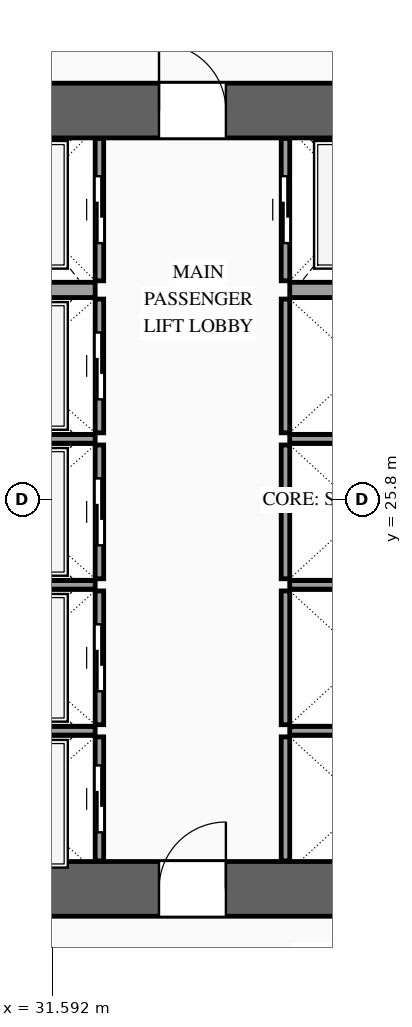
"""IFC4 building model, lengths in metres.
Left out: names, types, materials, properties, quantities, classifications, styles, units other than length and angle.
Written with IfcOpenShell. Run it as: python <this file> out.ifc"""

import sys

from ifc_helpers import new_model, si_unit, direction, frame, frame_2d, origin, place, context, subcontext, project, spatial, rectangle, extrude, source, transform, mapped, element, fill, save


model = new_model("IFC4")
c1 = context("Model", 3, precision=1e-05, world=origin(), true_north=direction((0.0, 1.0)))
c2 = subcontext(c1, "Body", "Model", "MODEL_VIEW")
j1 = project(units=[si_unit("LENGTHUNIT", "METRE"), si_unit("PLANEANGLEUNIT", "RADIAN")], contexts=[c1])
p1 = place(None, origin())
s1 = spatial("IfcSite", under=j1, at=p1, CompositionType="ELEMENT")
p2 = place(p1, origin())
s2 = spatial("IfcBuilding", under=s1, at=p2, CompositionType="ELEMENT")
p3 = place(p2, frame((0.0, 0.0, 78.4)))
s3 = spatial("IfcBuildingStorey", under=s2, at=p3, CompositionType="ELEMENT", Elevation=78.4)
p4 = place(p3, frame((23.35, 19.4, 0.0), z_axis=(0.0, 0.0, 1.0), x_axis=(1.0, 0.0, 0.0)))
e1 = element("IfcWall", 1, at=p4, inside=s3, PredefinedType="SHEAR", context=c2, shape_type="SweptSolid", body=[
    extrude(rectangle(XDim=27.3, YDim=0.9, at=frame_2d((13.65, 0.0))), origin(), (0.0, 0.0, 1.0), 3.6),
])
p5 = place(p4, frame((2.1, 0.0, 0.0)))
e2 = element("IfcOpeningElement", 2, at=p5, cuts=e1, PredefinedType="OPENING", context=c2, shape_type="SweptSolid", body=[
    extrude(rectangle(XDim=1.1, YDim=2.2, at=frame_2d((0.55, 1.1))), frame((0.0, 0.465, 0.0), z_axis=(0.0, -1.0, 0.0), x_axis=(1.0, 0.0, 0.0)), (0.0, 0.0, 1.0), 0.93),
])
p6 = place(p4, frame((10.0, 0.0, 0.0)))
e3 = element("IfcOpeningElement", 3, at=p6, cuts=e1, PredefinedType="OPENING", context=c2, shape_type="SweptSolid", body=[
    extrude(rectangle(XDim=1.1, YDim=2.2, at=frame_2d((0.55, 1.1))), frame((0.0, 0.465, 0.0), z_axis=(0.0, -1.0, 0.0), x_axis=(1.0, 0.0, 0.0)), (0.0, 0.0, 1.0), 0.93),
])
p7 = place(p4, frame((23.2, 0.0, 0.0)))
e4 = element("IfcOpeningElement", 4, at=p7, cuts=e1, PredefinedType="OPENING", context=c2, shape_type="SweptSolid", body=[
    extrude(rectangle(XDim=1.1, YDim=2.2, at=frame_2d((0.55, 1.1))), frame((0.0, 0.465, 0.0), z_axis=(0.0, -1.0, 0.0), x_axis=(1.0, 0.0, 0.0)), (0.0, 0.0, 1.0), 0.93),
])
p8 = place(p4, frame((19.82, 0.0, 0.0)))
e5 = element("IfcOpeningElement", 5, at=p8, cuts=e1, PredefinedType="OPENING", context=c2, shape_type="SweptSolid", body=[
    extrude(rectangle(XDim=0.9, YDim=2.15, at=frame_2d((0.45, 1.075))), frame((0.0, 0.465, 0.0), z_axis=(0.0, -1.0, 0.0), x_axis=(1.0, 0.0, 0.0)), (0.0, 0.0, 1.0), 0.93),
])
p9 = place(p4, frame((18.38, 0.0, 0.0)))
e6 = element("IfcOpeningElement", 6, at=p9, cuts=e1, PredefinedType="OPENING", context=c2, shape_type="SweptSolid", body=[
    extrude(rectangle(XDim=0.9, YDim=2.15, at=frame_2d((0.45, 1.075))), frame((0.0, 0.465, 0.0), z_axis=(0.0, -1.0, 0.0), x_axis=(1.0, 0.0, 0.0)), (0.0, 0.0, 1.0), 0.93),
])
p10 = place(p3, frame((23.35, 32.2, 0.0), z_axis=(0.0, 0.0, 1.0), x_axis=(1.0, 0.0, 0.0)))
e7 = element("IfcWall", 7, at=p10, inside=s3, PredefinedType="SHEAR", context=c2, shape_type="SweptSolid", body=[
    extrude(rectangle(XDim=27.3, YDim=0.9, at=frame_2d((13.65, 0.0))), origin(), (0.0, 0.0, 1.0), 3.6),
])
p11 = place(p10, frame((4.72, 0.0, 0.0)))
e8 = element("IfcOpeningElement", 8, at=p11, cuts=e7, PredefinedType="OPENING", context=c2, shape_type="SweptSolid", body=[
    extrude(rectangle(XDim=0.9, YDim=2.15, at=frame_2d((0.45, 1.075))), frame((0.0, 0.465, 0.0), z_axis=(0.0, -1.0, 0.0), x_axis=(1.0, 0.0, 0.0)), (0.0, 0.0, 1.0), 0.93),
])
p12 = place(p10, frame((10.0, 0.0, 0.0)))
e9 = element("IfcOpeningElement", 9, at=p12, cuts=e7, PredefinedType="OPENING", context=c2, shape_type="SweptSolid", body=[
    extrude(rectangle(XDim=1.1, YDim=2.2, at=frame_2d((0.55, 1.1))), frame((0.0, 0.465, 0.0), z_axis=(0.0, -1.0, 0.0), x_axis=(1.0, 0.0, 0.0)), (0.0, 0.0, 1.0), 0.93),
])
p13 = place(p10, frame((15.85, 0.0, 0.0)))
e10 = element("IfcOpeningElement", 10, at=p13, cuts=e7, PredefinedType="OPENING", context=c2, shape_type="SweptSolid", body=[
    extrude(rectangle(XDim=1.1, YDim=2.2, at=frame_2d((0.55, 1.1))), frame((0.0, 0.465, 0.0), z_axis=(0.0, -1.0, 0.0), x_axis=(1.0, 0.0, 0.0)), (0.0, 0.0, 1.0), 0.93),
])
p14 = place(p3, frame((32.37, 19.86, 0.0), z_axis=(0.0, 0.0, 1.0), x_axis=(0.0, 1.0, 0.0)))
e11 = element("IfcWall", 11, at=p14, inside=s3, PredefinedType="SOLIDWALL", context=c2, shape_type="SweptSolid", body=[
    extrude(rectangle(XDim=2.04, YDim=0.14, at=frame_2d((1.02, 0.0))), origin(), (0.0, 0.0, 1.0), 3.38),
])
p15 = place(p14, frame((0.47, 0.0, 0.0)))
e12 = element("IfcOpeningElement", 12, at=p15, cuts=e11, PredefinedType="OPENING", context=c2, shape_type="SweptSolid", body=[
    extrude(rectangle(XDim=1.1, YDim=2.2, at=frame_2d((0.55, 1.1))), frame((0.0, 0.085, 0.0), z_axis=(0.0, -1.0, 0.0), x_axis=(1.0, 0.0, 0.0)), (0.0, 0.0, 1.0), 0.17),
])
m1 = source(origin(), c2, "Body", "SweptSolid", [
    extrude(rectangle(XDim=2.5, YDim=0.14, at=frame_2d((1.25, 0.0))), origin(), (0.0, 0.0, 1.0), 3.38),
])
p16 = place(p3, frame((29.8, 22.0, 0.0), z_axis=(0.0, 0.0, 1.0), x_axis=(1.0, 0.0, 0.0)))
e13 = element("IfcWall", 13, at=p16, inside=s3, PredefinedType="SOLIDWALL", context=c2, shape_type="MappedRepresentation", body=[
    mapped(m1, transform((0.0, 0.0, 0.0), scale=1.0)),
])
p17 = place(p3, frame((32.37, 22.1, 0.0), z_axis=(0.0, 0.0, 1.0), x_axis=(0.0, 1.0, 0.0)))
e14 = element("IfcWall", 14, at=p17, inside=s3, PredefinedType="SOLIDWALL", context=c2, shape_type="SweptSolid", body=[
    extrude(rectangle(XDim=2.2, YDim=0.14, at=frame_2d((1.1, 0.0))), origin(), (0.0, 0.0, 1.0), 3.38),
])
p18 = place(p17, frame((0.55, 0.0, 0.0)))
e15 = element("IfcOpeningElement", 15, at=p18, cuts=e14, PredefinedType="OPENING", context=c2, shape_type="SweptSolid", body=[
    extrude(rectangle(XDim=1.1, YDim=2.2, at=frame_2d((0.55, 1.1))), frame((0.0, 0.085, 0.0), z_axis=(0.0, -1.0, 0.0), x_axis=(1.0, 0.0, 0.0)), (0.0, 0.0, 1.0), 0.17),
])
p19 = place(p3, frame((29.8, 24.4, 0.0), z_axis=(0.0, 0.0, 1.0), x_axis=(1.0, 0.0, 0.0)))
e16 = element("IfcWall", 16, at=p19, inside=s3, PredefinedType="SOLIDWALL", context=c2, shape_type="MappedRepresentation", body=[
    mapped(m1, transform((0.0, 0.0, 0.0), scale=1.0)),
])
p20 = place(p3, frame((32.37, 24.5, 0.0), z_axis=(0.0, 0.0, 1.0), x_axis=(0.0, 1.0, 0.0)))
e17 = element("IfcWall", 17, at=p20, inside=s3, PredefinedType="SOLIDWALL", context=c2, shape_type="SweptSolid", body=[
    extrude(rectangle(XDim=2.2, YDim=0.14, at=frame_2d((1.1, 0.0))), origin(), (0.0, 0.0, 1.0), 3.38),
])
p21 = place(p20, frame((0.55, 0.0, 0.0)))
e18 = element("IfcOpeningElement", 18, at=p21, cuts=e17, PredefinedType="OPENING", context=c2, shape_type="SweptSolid", body=[
    extrude(rectangle(XDim=1.1, YDim=2.2, at=frame_2d((0.55, 1.1))), frame((0.0, 0.085, 0.0), z_axis=(0.0, -1.0, 0.0), x_axis=(1.0, 0.0, 0.0)), (0.0, 0.0, 1.0), 0.17),
])
p22 = place(p3, frame((29.8, 26.8, 0.0), z_axis=(0.0, 0.0, 1.0), x_axis=(1.0, 0.0, 0.0)))
e19 = element("IfcWall", 19, at=p22, inside=s3, PredefinedType="SOLIDWALL", context=c2, shape_type="MappedRepresentation", body=[
    mapped(m1, transform((0.0, 0.0, 0.0), scale=1.0)),
])
p23 = place(p3, frame((32.37, 26.9, 0.0), z_axis=(0.0, 0.0, 1.0), x_axis=(0.0, 1.0, 0.0)))
e20 = element("IfcWall", 20, at=p23, inside=s3, PredefinedType="SOLIDWALL", context=c2, shape_type="SweptSolid", body=[
    extrude(rectangle(XDim=2.2, YDim=0.14, at=frame_2d((1.1, 0.0))), origin(), (0.0, 0.0, 1.0), 3.38),
])
p24 = place(p23, frame((0.55, 0.0, 0.0)))
e21 = element("IfcOpeningElement", 21, at=p24, cuts=e20, PredefinedType="OPENING", context=c2, shape_type="SweptSolid", body=[
    extrude(rectangle(XDim=1.1, YDim=2.2, at=frame_2d((0.55, 1.1))), frame((0.0, 0.085, 0.0), z_axis=(0.0, -1.0, 0.0), x_axis=(1.0, 0.0, 0.0)), (0.0, 0.0, 1.0), 0.17),
])
p25 = place(p3, frame((32.37, 29.4, 0.0), z_axis=(0.0, 0.0, 1.0), x_axis=(0.0, 1.0, 0.0)))
e22 = element("IfcWall", 22, at=p25, inside=s3, PredefinedType="SOLIDWALL", context=c2, shape_type="SweptSolid", body=[
    extrude(rectangle(XDim=2.34, YDim=0.14, at=frame_2d((1.17, 0.0))), origin(), (0.0, 0.0, 1.0), 3.38),
])
p26 = place(p25, frame((0.62, 0.0, 0.0)))
e23 = element("IfcOpeningElement", 23, at=p26, cuts=e22, PredefinedType="OPENING", context=c2, shape_type="SweptSolid", body=[
    extrude(rectangle(XDim=1.1, YDim=2.2, at=frame_2d((0.55, 1.1))), frame((0.0, 0.085, 0.0), z_axis=(0.0, -1.0, 0.0), x_axis=(1.0, 0.0, 0.0)), (0.0, 0.0, 1.0), 0.17),
])
m2 = source(origin(), c2, "Body", "SweptSolid", [
    extrude(rectangle(XDim=2.5, YDim=0.25, at=frame_2d((1.25, 0.0))), origin(), (0.0, 0.0, 1.0), 3.38),
])
p27 = place(p3, frame((29.8, 29.25, 0.0), z_axis=(0.0, 0.0, 1.0), x_axis=(1.0, 0.0, 0.0)))
e24 = element("IfcWall", 24, at=p27, inside=s3, PredefinedType="SOLIDWALL", context=c2, shape_type="MappedRepresentation", body=[
    mapped(m2, transform((0.0, 0.0, 0.0), scale=1.0)),
])
m3 = source(origin(), c2, "Body", "SweptSolid", [
    extrude(rectangle(XDim=2.04, YDim=0.14, at=frame_2d((1.02, 0.0))), origin(), (0.0, 0.0, 1.0), 3.38),
])
p28 = place(p3, frame((35.43, 19.86, 0.0), z_axis=(0.0, 0.0, 1.0), x_axis=(0.0, 1.0, 0.0)))
e25 = element("IfcWall", 25, at=p28, inside=s3, PredefinedType="SOLIDWALL", context=c2, shape_type="MappedRepresentation", body=[
    mapped(m3, transform((0.0, 0.0, 0.0), scale=1.0)),
])
m4 = source(origin(), c2, "Body", "SweptSolid", [
    extrude(rectangle(XDim=2.4, YDim=0.14, at=frame_2d((1.2, 0.0))), origin(), (0.0, 0.0, 1.0), 3.38),
])
p29 = place(p3, frame((35.5, 22.0, 0.0), z_axis=(0.0, 0.0, 1.0), x_axis=(1.0, 0.0, 0.0)))
e26 = element("IfcWall", 26, at=p29, inside=s3, PredefinedType="SOLIDWALL", context=c2, shape_type="MappedRepresentation", body=[
    mapped(m4, transform((0.0, 0.0, 0.0), scale=1.0)),
])
m5 = source(origin(), c2, "Body", "SweptSolid", [
    extrude(rectangle(XDim=2.2, YDim=0.14, at=frame_2d((1.1, 0.0))), origin(), (0.0, 0.0, 1.0), 3.38),
])
p30 = place(p3, frame((35.43, 22.1, 0.0), z_axis=(0.0, 0.0, 1.0), x_axis=(0.0, 1.0, 0.0)))
e27 = element("IfcWall", 27, at=p30, inside=s3, PredefinedType="SOLIDWALL", context=c2, shape_type="MappedRepresentation", body=[
    mapped(m5, transform((0.0, 0.0, 0.0), scale=1.0)),
])
p31 = place(p3, frame((35.5, 24.4, 0.0), z_axis=(0.0, 0.0, 1.0), x_axis=(1.0, 0.0, 0.0)))
e28 = element("IfcWall", 28, at=p31, inside=s3, PredefinedType="SOLIDWALL", context=c2, shape_type="MappedRepresentation", body=[
    mapped(m4, transform((0.0, 0.0, 0.0), scale=1.0)),
])
p32 = place(p3, frame((35.43, 24.5, 0.0), z_axis=(0.0, 0.0, 1.0), x_axis=(0.0, 1.0, 0.0)))
e29 = element("IfcWall", 29, at=p32, inside=s3, PredefinedType="SOLIDWALL", context=c2, shape_type="MappedRepresentation", body=[
    mapped(m5, transform((0.0, 0.0, 0.0), scale=1.0)),
])
p33 = place(p3, frame((35.5, 26.8, 0.0), z_axis=(0.0, 0.0, 1.0), x_axis=(1.0, 0.0, 0.0)))
e30 = element("IfcWall", 30, at=p33, inside=s3, PredefinedType="SOLIDWALL", context=c2, shape_type="MappedRepresentation", body=[
    mapped(m4, transform((0.0, 0.0, 0.0), scale=1.0)),
])
m6 = source(origin(), c2, "Body", "SweptSolid", [
    extrude(rectangle(XDim=2.2, YDim=0.14, at=frame_2d((1.1, 0.0))), origin(), (0.0, 0.0, 1.0), 3.38),
])
p34 = place(p3, frame((35.43, 26.9, 0.0), z_axis=(0.0, 0.0, 1.0), x_axis=(0.0, 1.0, 0.0)))
e31 = element("IfcWall", 31, at=p34, inside=s3, PredefinedType="SOLIDWALL", context=c2, shape_type="MappedRepresentation", body=[
    mapped(m6, transform((0.0, 0.0, 0.0), scale=1.0)),
])
p35 = place(p3, frame((35.43, 29.4, 0.0), z_axis=(0.0, 0.0, 1.0), x_axis=(0.0, 1.0, 0.0)))
e32 = element("IfcWall", 32, at=p35, inside=s3, PredefinedType="SOLIDWALL", context=c2, shape_type="SweptSolid", body=[
    extrude(rectangle(XDim=2.34, YDim=0.14, at=frame_2d((1.17, 0.0))), origin(), (0.0, 0.0, 1.0), 3.38),
])
p36 = place(p35, frame((0.62, 0.0, 0.0)))
e33 = element("IfcOpeningElement", 33, at=p36, cuts=e32, PredefinedType="OPENING", context=c2, shape_type="SweptSolid", body=[
    extrude(rectangle(XDim=1.1, YDim=2.2, at=frame_2d((0.55, 1.1))), frame((0.0, 0.085, 0.0), z_axis=(0.0, -1.0, 0.0), x_axis=(1.0, 0.0, 0.0)), (0.0, 0.0, 1.0), 0.17),
])
m7 = source(origin(), c2, "Body", "SweptSolid", [
    extrude(rectangle(XDim=2.4, YDim=0.25, at=frame_2d((1.2, 0.0))), origin(), (0.0, 0.0, 1.0), 3.38),
])
p37 = place(p3, frame((35.5, 29.25, 0.0), z_axis=(0.0, 0.0, 1.0), x_axis=(1.0, 0.0, 0.0)))
e34 = element("IfcWall", 34, at=p37, inside=s3, PredefinedType="SOLIDWALL", context=c2, shape_type="MappedRepresentation", body=[
    mapped(m7, transform((0.0, 0.0, 0.0), scale=1.0)),
])
m8 = source(origin(), c2, "Body", "SweptSolid", [
    extrude(rectangle(XDim=1.1, YDim=2.2, at=frame_2d((0.55, 1.1))), frame((0.0, 0.025, 0.0), z_axis=(0.0, -1.0, 0.0), x_axis=(1.0, 0.0, 0.0)), (0.0, 0.0, 1.0), 0.05),
])
p38 = place(p15, origin())
e35 = element("IfcDoor", 35, at=p38, inside=s3, OperationType="SLIDING_TO_LEFT", PredefinedType="DOOR", context=c2, shape_type="MappedRepresentation", body=[
    mapped(m8, transform((0.0, 0.0, 0.0), scale=1.0)),
])
fill(e12, e35)
p39 = place(p18, origin())
e36 = element("IfcDoor", 36, at=p39, inside=s3, OperationType="SLIDING_TO_RIGHT", PredefinedType="DOOR", context=c2, shape_type="MappedRepresentation", body=[
    mapped(m8, transform((0.0, 0.0, 0.0), scale=1.0)),
])
fill(e15, e36)
p40 = place(p21, origin())
e37 = element("IfcDoor", 37, at=p40, inside=s3, OperationType="SLIDING_TO_LEFT", PredefinedType="DOOR", context=c2, shape_type="MappedRepresentation", body=[
    mapped(m8, transform((0.0, 0.0, 0.0), scale=1.0)),
])
fill(e18, e37)
p41 = place(p24, origin())
e38 = element("IfcDoor", 38, at=p41, inside=s3, OperationType="SLIDING_TO_RIGHT", PredefinedType="DOOR", context=c2, shape_type="MappedRepresentation", body=[
    mapped(m8, transform((0.0, 0.0, 0.0), scale=1.0)),
])
fill(e21, e38)
p42 = place(p26, origin())
e39 = element("IfcDoor", 39, at=p42, inside=s3, OperationType="SLIDING_TO_LEFT", PredefinedType="DOOR", context=c2, shape_type="MappedRepresentation", body=[
    mapped(m8, transform((0.0, 0.0, 0.0), scale=1.0)),
])
fill(e23, e39)
p43 = place(p36, origin())
e40 = element("IfcDoor", 40, at=p43, inside=s3, OperationType="SLIDING_TO_RIGHT", PredefinedType="DOOR", context=c2, shape_type="MappedRepresentation", body=[
    mapped(m8, transform((0.0, 0.0, 0.0), scale=1.0)),
])
fill(e33, e40)
m9 = source(origin(), c2, "Body", "SweptSolid", [
    extrude(rectangle(XDim=1.1, YDim=2.2, at=frame_2d((0.55, 1.1))), frame((0.0, 0.025, 0.0), z_axis=(0.0, -1.0, 0.0), x_axis=(1.0, 0.0, 0.0)), (0.0, 0.0, 1.0), 0.05),
])
p44 = place(p6, origin())
e41 = element("IfcDoor", 41, at=p44, inside=s3, OperationType="SINGLE_SWING_RIGHT", PredefinedType="DOOR", context=c2, shape_type="MappedRepresentation", body=[
    mapped(m9, transform((0.0, 0.0, 0.0), scale=1.0)),
])
fill(e3, e41)
p45 = place(p12, origin())
e42 = element("IfcDoor", 42, at=p45, inside=s3, OperationType="SINGLE_SWING_LEFT", PredefinedType="DOOR", context=c2, shape_type="MappedRepresentation", body=[
    mapped(m9, transform((0.0, 0.0, 0.0), scale=1.0)),
])
fill(e9, e42)
save(model, sys.argv[1])
